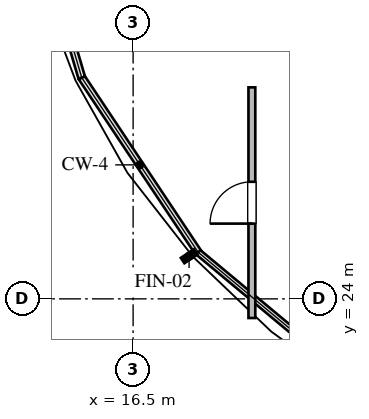
"""IFC4 building model, lengths in metres.
Left out: names, types, materials, properties, quantities, classifications, styles, units other than length and angle.
Written with IfcOpenShell. Run it as: python <this file> out.ifc"""

import sys

from ifc_helpers import new_model, si_unit, direction, frame, frame_2d, origin, place, context, subcontext, project, spatial, rectangle, extrude, element, fill, save


model = new_model("IFC4")
c1 = context("Model", 3, precision=1e-05, world=origin(), true_north=direction((0.0, 1.0)))
c2 = subcontext(c1, "Body", "Model", "MODEL_VIEW")
j1 = project(units=[si_unit("LENGTHUNIT", "METRE"), si_unit("PLANEANGLEUNIT", "RADIAN")], contexts=[c1])
p1 = place(None, origin())
s1 = spatial("IfcSite", under=j1, at=p1, CompositionType="ELEMENT")
p2 = place(p1, origin())
s2 = spatial("IfcBuilding", under=s1, at=p2, CompositionType="ELEMENT")
p3 = place(p2, frame((0.0, 0.0, 210.0)))
s3 = spatial("IfcBuildingStorey", under=s2, at=p3, CompositionType="ELEMENT", Elevation=210.0)
p4 = place(p3, frame((19.625, 23.496, 0.0), z_axis=(0.0, 0.0, 1.0), x_axis=(0.0, 1.0, 0.0)))
e1 = element("IfcWall", 1, at=p4, inside=s3, PredefinedType="PARTITIONING", context=c2, shape_type="SweptSolid", body=[
    extrude(rectangle(XDim=6.069, YDim=0.18, at=frame_2d((3.034, 0.0))), origin(), (0.0, 0.0, 1.0), 2.817),
])
p5 = place(p4, frame((2.484, 0.0, 0.0)))
e2 = element("IfcOpeningElement", 2, at=p5, cuts=e1, PredefinedType="OPENING", context=c2, shape_type="SweptSolid", body=[
    extrude(rectangle(XDim=1.1, YDim=2.1, at=frame_2d((0.55, 1.05))), frame((0.0, 0.1, 0.0), z_axis=(0.0, -1.0, 0.0), x_axis=(1.0, 0.0, 0.0)), (0.0, 0.0, 1.0), 0.2),
])
p6 = place(p5, origin())
e3 = element("IfcDoor", 3, at=p6, inside=s3, OperationType="SINGLE_SWING_LEFT", PredefinedType="DOOR", context=c2, shape_type="SweptSolid", body=[
    extrude(rectangle(XDim=1.1, YDim=2.1, at=frame_2d((0.55, 1.05))), frame((0.0, 0.025, 0.0), z_axis=(0.0, -1.0, 0.0), x_axis=(1.0, 0.0, 0.0)), (0.0, 0.0, 1.0), 0.05),
])
fill(e2, e3)
save(model, sys.argv[1])
